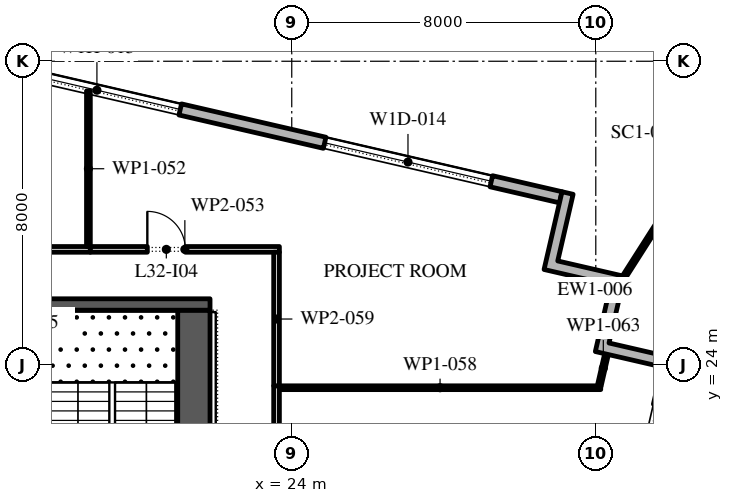
"""IFC4 building model, lengths in metres.
Left out: names, types, materials, properties, quantities, classifications, styles, units other than length and angle.
Written with IfcOpenShell. Run it as: python <this file> out.ifc"""

import sys

from ifc_helpers import new_model, si_unit, direction, frame, frame_2d, origin, place, context, subcontext, project, spatial, polyline, rectangle, outline, extrude, element, fill, save


model = new_model("IFC4")
c1 = context("Model", 3, precision=1e-05, world=origin(), true_north=direction((0.0, 1.0)))
c2 = subcontext(c1, "Body", "Model", "MODEL_VIEW")
j1 = project(units=[si_unit("LENGTHUNIT", "METRE"), si_unit("PLANEANGLEUNIT", "RADIAN")], contexts=[c1])
p1 = place(None, origin())
s1 = spatial("IfcSite", under=j1, at=p1, CompositionType="ELEMENT")
p2 = place(p1, origin())
s2 = spatial("IfcBuilding", under=s1, at=p2, CompositionType="ELEMENT")
p3 = place(p2, frame((0.0, 0.0, 147.6)))
s3 = spatial("IfcBuildingStorey", under=s2, at=p3, CompositionType="ELEMENT", Elevation=147.6)
p4 = place(p3, frame((31.078, 28.421, 0.0), z_axis=(0.0, 0.0, 1.0), x_axis=(-0.974370456532, 0.224949357493, 0.0)))
e1 = element("IfcWall", 1, at=p4, inside=s3, PredefinedType="STANDARD", context=c2, shape_type="SweptSolid", body=[
    extrude(rectangle(XDim=51.0, YDim=0.3, at=frame_2d((25.5, 0.0))), origin(), (0.0, 0.0, 1.0), 4.0),
])
p5 = place(p4, frame((1.875, 0.0, 0.45)))
e2 = element("IfcOpeningElement", 2, at=p5, cuts=e1, PredefinedType="OPENING", context=c2, shape_type="SweptSolid", body=[
    extrude(rectangle(XDim=4.5, YDim=2.875, at=frame_2d((2.25, 1.438))), frame((0.0, 0.16, 0.0), z_axis=(0.0, -1.0, 0.0), x_axis=(1.0, 0.0, 0.0)), (0.0, 0.0, 1.0), 0.32),
])
p6 = place(p4, frame((10.275, 0.0, 0.45)))
e3 = element("IfcOpeningElement", 3, at=p6, cuts=e1, PredefinedType="OPENING", context=c2, shape_type="SweptSolid", body=[
    extrude(rectangle(XDim=4.5, YDim=2.75, at=frame_2d((2.25, 1.375))), frame((0.0, 0.16, 0.0), z_axis=(0.0, -1.0, 0.0), x_axis=(1.0, 0.0, 0.0)), (0.0, 0.0, 1.0), 0.32),
])
p7 = place(p4, frame((18.825, 0.0, 0.45)))
e4 = element("IfcOpeningElement", 4, at=p7, cuts=e1, PredefinedType="OPENING", context=c2, shape_type="SweptSolid", body=[
    extrude(rectangle(XDim=4.5, YDim=2.675, at=frame_2d((2.25, 1.337))), frame((0.0, 0.16, 0.0), z_axis=(0.0, -1.0, 0.0), x_axis=(1.0, 0.0, 0.0)), (0.0, 0.0, 1.0), 0.32),
])
p8 = place(p4, frame((28.425, 0.0, 0.0)))
e5 = element("IfcOpeningElement", 5, at=p8, cuts=e1, PredefinedType="OPENING", context=c2, shape_type="SweptSolid", body=[
    extrude(rectangle(XDim=2.4, YDim=3.025, at=frame_2d((1.2, 1.512))), frame((0.0, 0.16, 0.0), z_axis=(0.0, -1.0, 0.0), x_axis=(1.0, 0.0, 0.0)), (0.0, 0.0, 1.0), 0.32),
])
p9 = place(p4, frame((35.925, 0.0, 0.45)))
e6 = element("IfcOpeningElement", 6, at=p9, cuts=e1, PredefinedType="OPENING", context=c2, shape_type="SweptSolid", body=[
    extrude(rectangle(XDim=4.5, YDim=2.525, at=frame_2d((2.25, 1.262))), frame((0.0, 0.16, 0.0), z_axis=(0.0, -1.0, 0.0), x_axis=(1.0, 0.0, 0.0)), (0.0, 0.0, 1.0), 0.32),
])
p10 = place(p4, frame((44.475, 0.0, 0.45)))
e7 = element("IfcOpeningElement", 7, at=p10, cuts=e1, PredefinedType="OPENING", context=c2, shape_type="SweptSolid", body=[
    extrude(rectangle(XDim=4.5, YDim=2.45, at=frame_2d((2.25, 1.225))), frame((0.0, 0.16, 0.0), z_axis=(0.0, -1.0, 0.0), x_axis=(1.0, 0.0, 0.0)), (0.0, 0.0, 1.0), 0.32),
])
p11 = place(p3, origin())
e8 = element("IfcWall", 8, at=p11, inside=s3, PredefinedType="STANDARD", context=c2, shape_type="SweptSolid", body=[
    extrude(outline(polyline([(32.393, 26.116), (30.639, 26.521), (31.111, 28.567), (31.404, 28.5), (30.999, 26.746), (32.753, 26.341), (32.348, 24.587), (33.809, 24.25), (33.742, 23.957), (31.988, 24.362), (32.393, 26.116)])), origin(), (0.0, 0.0, 1.0), 4.0),
])
p12 = place(p3, frame((32.753, 26.341, -0.05), z_axis=(0.0, 0.0, 1.0), x_axis=(0.537832482238, 0.843051730945, 0.0)))
e9 = element("IfcWall", 9, at=p12, inside=s3, PredefinedType="STANDARD", context=c2, shape_type="SweptSolid", body=[
    extrude(rectangle(XDim=6.238, YDim=0.1, at=frame_2d((3.119, 0.0))), origin(), (0.0, 0.0, 1.0), 4.05),
])
p13 = place(p3, frame((21.425, -2.45, 0.0), z_axis=(0.0, 0.0, 1.0), x_axis=(0.0, 1.0, 0.0)))
e10 = element("IfcWall", 10, at=p13, inside=s3, PredefinedType="SHEAR", context=c2, shape_type="SweptSolid", body=[
    extrude(rectangle(XDim=27.9, YDim=0.85, at=frame_2d((13.95, 0.0))), origin(), (0.0, 0.0, 1.0), 4.0),
])
p14 = place(p13, frame((5.05, 0.0, 0.0)))
e11 = element("IfcOpeningElement", 11, at=p14, cuts=e10, PredefinedType="OPENING", context=c2, shape_type="SweptSolid", body=[
    extrude(rectangle(XDim=1.2, YDim=2.1, at=frame_2d((0.6, 1.05))), frame((0.0, 0.435, 0.0), z_axis=(0.0, -1.0, 0.0), x_axis=(1.0, 0.0, 0.0)), (0.0, 0.0, 1.0), 0.87),
])
p15 = place(p13, frame((21.65, 0.0, 0.0)))
e12 = element("IfcOpeningElement", 12, at=p15, cuts=e10, PredefinedType="OPENING", context=c2, shape_type="SweptSolid", body=[
    extrude(rectangle(XDim=1.2, YDim=2.1, at=frame_2d((0.6, 1.05))), frame((0.0, 0.435, 0.0), z_axis=(0.0, -1.0, 0.0), x_axis=(1.0, 0.0, 0.0)), (0.0, 0.0, 1.0), 0.87),
])
p16 = place(p3, frame((10.15, 25.6, 0.0), z_axis=(0.0, 0.0, 1.0), x_axis=(1.0, 0.0, 0.0)))
e13 = element("IfcWall", 13, at=p16, inside=s3, PredefinedType="SHEAR", context=c2, shape_type="SweptSolid", body=[
    extrude(rectangle(XDim=11.7, YDim=0.3, at=frame_2d((5.85, 0.0))), origin(), (0.0, 0.0, 1.0), 4.0),
])
p17 = place(p3, frame((8.4, 27.05, 0.0), z_axis=(0.0, 0.0, 1.0), x_axis=(1.0, 0.0, 0.0)))
e14 = element("IfcWall", 14, at=p17, inside=s3, PredefinedType="PARTITIONING", context=c2, shape_type="SweptSolid", body=[
    extrude(rectangle(XDim=10.3, YDim=0.15, at=frame_2d((5.15, 0.0))), origin(), (0.0, 0.0, 1.0), 4.0),
])
p18 = place(p17, frame((6.6, 0.0, 0.0)))
e15 = element("IfcOpeningElement", 15, at=p18, cuts=e14, PredefinedType="OPENING", context=c2, shape_type="SweptSolid", body=[
    extrude(rectangle(XDim=1.0, YDim=2.1, at=frame_2d((0.5, 1.05))), frame((0.0, 0.085, 0.0), z_axis=(0.0, -1.0, 0.0), x_axis=(1.0, 0.0, 0.0)), (0.0, 0.0, 1.0), 0.17),
])
p19 = place(p3, frame((18.65, 27.125, 0.0), z_axis=(0.0, 0.0, 1.0), x_axis=(0.0, 1.0, 0.0)))
e16 = element("IfcWall", 16, at=p19, inside=s3, PredefinedType="PARTITIONING", context=c2, shape_type="SweptSolid", body=[
    extrude(rectangle(XDim=4.094, YDim=0.1, at=frame_2d((2.047, 0.0))), origin(), (0.0, 0.0, 1.0), 4.0),
])
p20 = place(p3, frame((18.7, 27.05, 0.0), z_axis=(0.0, 0.0, 1.0), x_axis=(1.0, 0.0, 0.0)))
e17 = element("IfcWall", 17, at=p20, inside=s3, PredefinedType="PARTITIONING", context=c2, shape_type="SweptSolid", body=[
    extrude(rectangle(XDim=4.975, YDim=0.15, at=frame_2d((2.488, 0.0))), origin(), (0.0, 0.0, 1.0), 4.0),
])
p21 = place(p20, frame((1.5, 0.0, 0.0)))
e18 = element("IfcOpeningElement", 18, at=p21, cuts=e17, PredefinedType="OPENING", context=c2, shape_type="SweptSolid", body=[
    extrude(rectangle(XDim=1.0, YDim=2.1, at=frame_2d((0.5, 1.05))), frame((0.0, 0.085, 0.0), z_axis=(0.0, -1.0, 0.0), x_axis=(1.0, 0.0, 0.0)), (0.0, 0.0, 1.0), 0.17),
])
p22 = place(p3, frame((23.6, 23.46, 0.0), z_axis=(0.0, 0.0, 1.0), x_axis=(0.0, -1.0, 0.0)))
e19 = element("IfcWall", 19, at=p22, inside=s3, PredefinedType="PARTITIONING", context=c2, shape_type="SweptSolid", body=[
    extrude(rectangle(XDim=13.02, YDim=0.15, at=frame_2d((6.51, 0.0))), origin(), (0.0, 0.0, 1.0), 4.0),
])
p23 = place(p22, frame((6.17, 0.0, 0.0)))
e20 = element("IfcOpeningElement", 20, at=p23, cuts=e19, PredefinedType="OPENING", context=c2, shape_type="SweptSolid", body=[
    extrude(rectangle(XDim=1.0, YDim=2.1, at=frame_2d((0.5, 1.05))), frame((0.0, 0.085, 0.0), z_axis=(0.0, -1.0, 0.0), x_axis=(1.0, 0.0, 0.0)), (0.0, 0.0, 1.0), 0.17),
])
p24 = place(p3, frame((23.675, 23.41, 0.0), z_axis=(0.0, 0.0, 1.0), x_axis=(1.0, 0.0, 0.0)))
e21 = element("IfcWall", 21, at=p24, inside=s3, PredefinedType="PARTITIONING", context=c2, shape_type="SweptSolid", body=[
    extrude(rectangle(XDim=8.455, YDim=0.1, at=frame_2d((4.228, 0.0))), origin(), (0.0, 0.0, 1.0), 4.0),
])
p25 = place(p3, frame((23.6, 26.975, 0.0), z_axis=(0.0, 0.0, 1.0), x_axis=(0.0, -1.0, 0.0)))
e22 = element("IfcWall", 22, at=p25, inside=s3, PredefinedType="PARTITIONING", context=c2, shape_type="SweptSolid", body=[
    extrude(rectangle(XDim=3.515, YDim=0.15, at=frame_2d((1.758, 0.0))), origin(), (0.0, 0.0, 1.0), 4.0),
])
p26 = place(p3, frame((32.091, 23.459, 0.0), z_axis=(0.0, 0.0, 1.0), x_axis=(0.223406444343, 0.97472537703, 0.0)))
e23 = element("IfcWall", 23, at=p26, inside=s3, PredefinedType="PARTITIONING", context=c2, shape_type="SweptSolid", body=[
    extrude(rectangle(XDim=0.957, YDim=0.1, at=frame_2d((0.479, 0.0))), origin(), (0.0, 0.0, 1.0), 4.0),
])
p27 = place(p3, frame((23.014, -23.176, 0.0), z_axis=(0.0, 0.0, 1.0), x_axis=(0.2249511548, 0.974370041593, 0.0)))
e24 = element("IfcWall", 24, at=p27, inside=s3, PredefinedType="STANDARD", context=c2, shape_type="SweptSolid", body=[
    extrude(rectangle(XDim=48.638, YDim=0.3, at=frame_2d((24.319, 0.0))), origin(), (0.0, 0.0, 1.0), 4.0),
])
p28 = place(p27, frame((0.295, 0.0, 0.45)))
e25 = element("IfcOpeningElement", 25, at=p28, cuts=e24, PredefinedType="OPENING", context=c2, shape_type="SweptSolid", body=[
    extrude(rectangle(XDim=4.5, YDim=3.05, at=frame_2d((2.25, 1.525))), frame((0.0, 0.16, 0.0), z_axis=(0.0, -1.0, 0.0), x_axis=(1.0, 0.0, 0.0)), (0.0, 0.0, 1.0), 0.32),
])
p29 = place(p27, frame((7.259, 0.0, 0.45)))
e26 = element("IfcOpeningElement", 26, at=p29, cuts=e24, PredefinedType="OPENING", context=c2, shape_type="SweptSolid", body=[
    extrude(rectangle(XDim=4.5, YDim=3.05, at=frame_2d((2.25, 1.525))), frame((0.0, 0.16, 0.0), z_axis=(0.0, -1.0, 0.0), x_axis=(1.0, 0.0, 0.0)), (0.0, 0.0, 1.0), 0.32),
])
p30 = place(p27, frame((14.374, 0.0, 0.45)))
e27 = element("IfcOpeningElement", 27, at=p30, cuts=e24, PredefinedType="OPENING", context=c2, shape_type="SweptSolid", body=[
    extrude(rectangle(XDim=4.5, YDim=3.05, at=frame_2d((2.25, 1.525))), frame((0.0, 0.16, 0.0), z_axis=(0.0, -1.0, 0.0), x_axis=(1.0, 0.0, 0.0)), (0.0, 0.0, 1.0), 0.32),
])
p31 = place(p27, frame((22.538, 0.0, 0.0)))
e28 = element("IfcOpeningElement", 28, at=p31, cuts=e24, PredefinedType="OPENING", context=c2, shape_type="SweptSolid", body=[
    extrude(rectangle(XDim=2.4, YDim=3.5, at=frame_2d((1.2, 1.75))), frame((0.0, 0.16, 0.0), z_axis=(0.0, -1.0, 0.0), x_axis=(1.0, 0.0, 0.0)), (0.0, 0.0, 1.0), 0.32),
])
p32 = place(p27, frame((28.602, 0.0, 0.45)))
e29 = element("IfcOpeningElement", 29, at=p32, cuts=e24, PredefinedType="OPENING", context=c2, shape_type="SweptSolid", body=[
    extrude(rectangle(XDim=4.5, YDim=2.875, at=frame_2d((2.25, 1.438))), frame((0.0, 0.16, 0.0), z_axis=(0.0, -1.0, 0.0), x_axis=(1.0, 0.0, 0.0)), (0.0, 0.0, 1.0), 0.32),
])
p33 = place(p27, frame((35.716, 0.0, 0.45)))
e30 = element("IfcOpeningElement", 30, at=p33, cuts=e24, PredefinedType="OPENING", context=c2, shape_type="SweptSolid", body=[
    extrude(rectangle(XDim=4.5, YDim=2.825, at=frame_2d((2.25, 1.413))), frame((0.0, 0.16, 0.0), z_axis=(0.0, -1.0, 0.0), x_axis=(1.0, 0.0, 0.0)), (0.0, 0.0, 1.0), 0.32),
])
p34 = place(p27, frame((42.831, 0.0, 0.45)))
e31 = element("IfcOpeningElement", 31, at=p34, cuts=e24, PredefinedType="OPENING", context=c2, shape_type="SweptSolid", body=[
    extrude(rectangle(XDim=4.5, YDim=2.75, at=frame_2d((2.25, 1.375))), frame((0.0, 0.16, 0.0), z_axis=(0.0, -1.0, 0.0), x_axis=(1.0, 0.0, 0.0)), (0.0, 0.0, 1.0), 0.32),
])
p35 = place(p34, origin())
e32 = element("IfcWindow", 32, at=p35, inside=s3, PartitioningType="DOUBLE_PANEL_VERTICAL", PredefinedType="WINDOW", context=c2, shape_type="SweptSolid", body=[
    extrude(rectangle(XDim=4.5, YDim=2.75, at=frame_2d((2.25, 1.375))), frame((0.0, 0.03, 0.0), z_axis=(0.0, -1.0, 0.0), x_axis=(1.0, 0.0, 0.0)), (0.0, 0.0, 1.0), 0.06),
])
fill(e31, e32)
p36 = place(p5, origin())
e33 = element("IfcWindow", 33, at=p36, inside=s3, PartitioningType="DOUBLE_PANEL_VERTICAL", PredefinedType="WINDOW", context=c2, shape_type="SweptSolid", body=[
    extrude(rectangle(XDim=4.5, YDim=2.875, at=frame_2d((2.25, 1.438))), frame((0.0, 0.03, 0.0), z_axis=(0.0, -1.0, 0.0), x_axis=(1.0, 0.0, 0.0)), (0.0, 0.0, 1.0), 0.06),
])
fill(e2, e33)
p37 = place(p6, origin())
e34 = element("IfcWindow", 34, at=p37, inside=s3, PartitioningType="DOUBLE_PANEL_VERTICAL", PredefinedType="WINDOW", context=c2, shape_type="SweptSolid", body=[
    extrude(rectangle(XDim=4.5, YDim=2.75, at=frame_2d((2.25, 1.375))), frame((0.0, 0.03, 0.0), z_axis=(0.0, -1.0, 0.0), x_axis=(1.0, 0.0, 0.0)), (0.0, 0.0, 1.0), 0.06),
])
fill(e3, e34)
p38 = place(p21, origin())
e35 = element("IfcDoor", 35, at=p38, inside=s3, OperationType="SINGLE_SWING_RIGHT", PredefinedType="DOOR", context=c2, shape_type="SweptSolid", body=[
    extrude(rectangle(XDim=1.0, YDim=2.1, at=frame_2d((0.5, 1.05))), frame((0.0, 0.025, 0.0), z_axis=(0.0, -1.0, 0.0), x_axis=(1.0, 0.0, 0.0)), (0.0, 0.0, 1.0), 0.05),
])
fill(e18, e35)
save(model, sys.argv[1])
